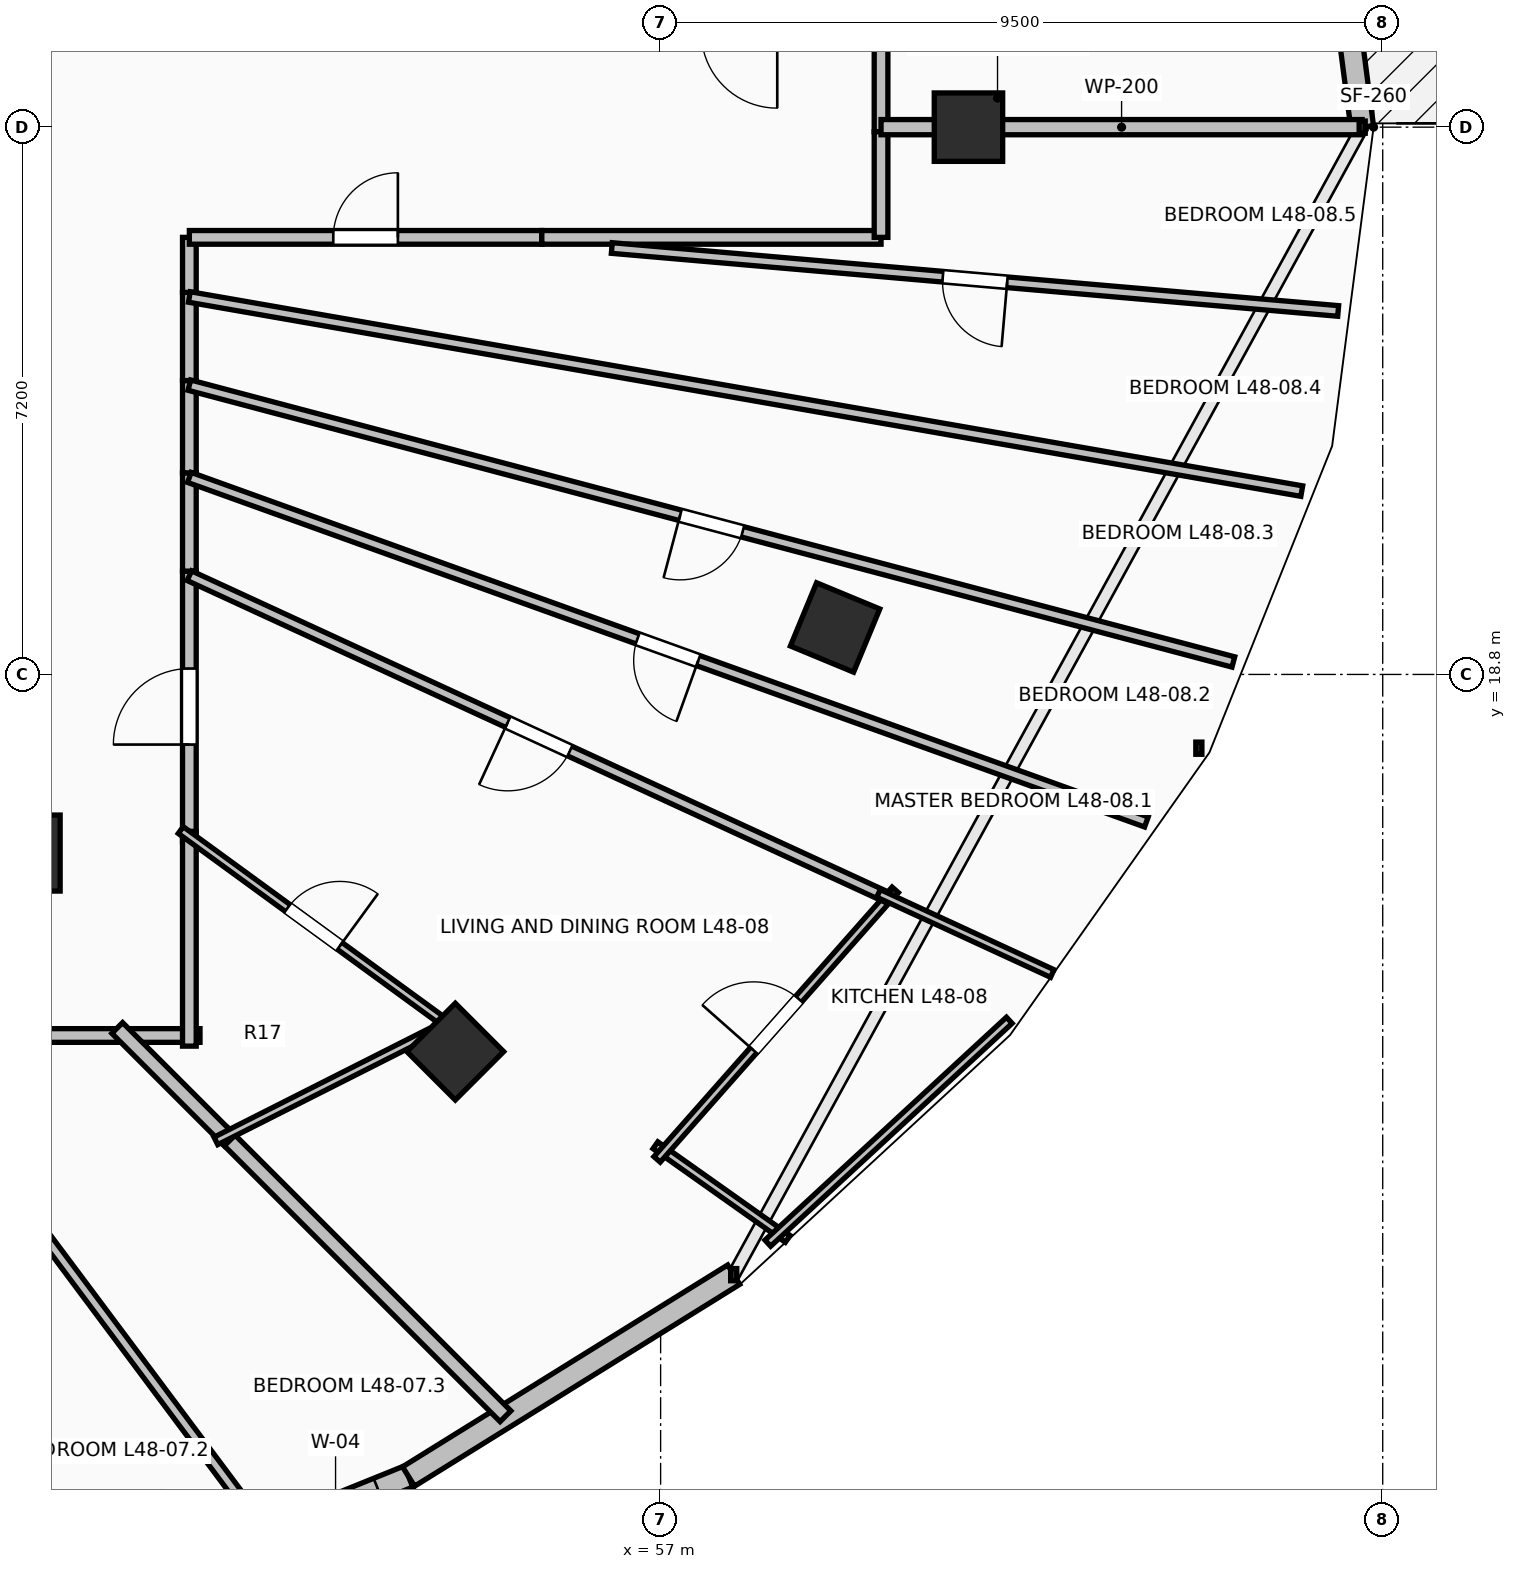
"""IFC4 building model, lengths in metres.
Left out: names, types, materials, properties, quantities, classifications, styles, units other than length and angle.
Written with IfcOpenShell. Run it as: python <this file> out.ifc"""

import sys

from ifc_helpers import new_model, si_unit, direction, frame, frame_2d, origin, origin_2d, place, context, subcontext, project, spatial, rectangle, extrude, element, fill, save


model = new_model("IFC4")
c1 = context("Model", 3, precision=1e-05, world=origin(), true_north=direction((0.0, 1.0)))
c2 = subcontext(c1, "Body", "Model", "MODEL_VIEW")
j1 = project(units=[si_unit("LENGTHUNIT", "METRE"), si_unit("PLANEANGLEUNIT", "RADIAN")], contexts=[c1])
p1 = place(None, origin())
s1 = spatial("IfcSite", under=j1, at=p1, CompositionType="ELEMENT")
p2 = place(p1, origin())
s2 = spatial("IfcBuilding", under=s1, at=p2, CompositionType="ELEMENT")
p3 = place(p2, frame((0.0, 0.0, 179.1)))
s3 = spatial("IfcBuildingStorey", under=s2, at=p3, CompositionType="ELEMENT", Elevation=179.1)
for number, where, z_axis, x_axis in (
    (1, (61.05, 26.0, 0.0), (0.0, 0.0, 1.0), (1.0, 0.0, 0.0)),
    (2, (54.299, 13.838, 0.0), (0.0, 0.0, 1.0), (0.707, -0.707, 0.0)),
    (3, (59.295, 19.418, 0.0), (0.0, 0.0, 1.0), (0.924, -0.383, 0.0)),
):
    element("IfcColumn", number, at=place(p3, frame(where, z_axis=z_axis, x_axis=x_axis)), inside=s3, PredefinedType="COLUMN", context=c2, shape_type="SweptSolid", body=[
        extrude(rectangle(XDim=0.9, YDim=0.9, at=origin_2d()), origin(), (0.0, 0.0, 1.0), 3.5),
    ])
p4 = place(p3, frame((48.75, 16.45, 0.0), z_axis=(0.0, 0.0, 1.0), x_axis=(1.0, 0.0, 0.0)))
e4 = element("IfcColumn", 4, at=p4, inside=s3, PredefinedType="PILASTER", context=c2, shape_type="SweptSolid", body=[
    extrude(rectangle(XDim=0.7, YDim=1.0, at=origin_2d()), origin(), (0.0, 0.0, 1.0), 3.5),
])
p5 = place(p3, frame((66.23, 26.0, 0.0), z_axis=(0.0, 0.0, 1.0), x_axis=(-0.129147853268, 0.991625348605, 0.0)))
e5 = element("IfcWall", 5, at=p5, inside=s3, PredefinedType="STANDARD", context=c2, shape_type="SweptSolid", body=[
    extrude(rectangle(XDim=4.2, YDim=0.3, at=frame_2d((2.1, 0.0))), origin(), (0.0, 0.0, 1.0), 3.24),
])
p6 = place(p5, frame((1.3, 0.0, 0.0)))
e6 = element("IfcOpeningElement", 6, at=p6, cuts=e5, PredefinedType="OPENING", context=c2, shape_type="SweptSolid", body=[
    extrude(rectangle(XDim=1.6, YDim=2.3, at=frame_2d((0.8, 1.15))), frame((0.0, 0.165, 0.0), z_axis=(0.0, -1.0, 0.0), x_axis=(1.0, 0.0, 0.0)), (0.0, 0.0, 1.0), 0.33),
])
p7 = place(p3, frame((48.803, 6.275, 0.0), z_axis=(0.0, 0.0, 1.0), x_axis=(0.927111094334, 0.374786630981, 0.0)))
e7 = element("IfcWall", 7, at=p7, inside=s3, PredefinedType="STANDARD", context=c2, shape_type="SweptSolid", body=[
    extrude(rectangle(XDim=5.264, YDim=0.3, at=frame_2d((2.632, 0.0))), origin(), (0.0, 0.0, 1.0), 3.24),
])
p8 = place(p7, frame((1.618, 0.0, 0.85)))
e8 = element("IfcOpeningElement", 8, at=p8, cuts=e7, PredefinedType="OPENING", context=c2, shape_type="SweptSolid", body=[
    extrude(rectangle(XDim=1.2, YDim=1.95, at=frame_2d((0.6, 0.975))), frame((0.0, 0.165, 0.0), z_axis=(0.0, -1.0, 0.0), x_axis=(1.0, 0.0, 0.0)), (0.0, 0.0, 1.0), 0.33),
])
p9 = place(p7, frame((3.628, 0.0, 0.85)))
e9 = element("IfcOpeningElement", 9, at=p9, cuts=e7, PredefinedType="OPENING", context=c2, shape_type="SweptSolid", body=[
    extrude(rectangle(XDim=1.2, YDim=1.95, at=frame_2d((0.6, 0.975))), frame((0.0, 0.165, 0.0), z_axis=(0.0, -1.0, 0.0), x_axis=(1.0, 0.0, 0.0)), (0.0, 0.0, 1.0), 0.33),
])
p10 = place(p3, frame((53.684, 8.248, 0.0), z_axis=(0.0, 0.0, 1.0), x_axis=(0.849647657754, 0.527350791858, 0.0)))
e10 = element("IfcWall", 10, at=p10, inside=s3, PredefinedType="STANDARD", context=c2, shape_type="SweptSolid", body=[
    extrude(rectangle(XDim=5.035, YDim=0.3, at=frame_2d((2.518, 0.0))), origin(), (0.0, 0.0, 1.0), 3.24),
])
p11 = place(p3, frame((59.9, 25.94, 0.0), z_axis=(0.0, 0.0, 1.0), x_axis=(0.0, 1.0, 0.0)))
e11 = element("IfcWall", 11, at=p11, inside=s3, PredefinedType="PARTITIONING", context=c2, shape_type="SweptSolid", body=[
    extrude(rectangle(XDim=1.31, YDim=0.18, at=frame_2d((0.655, 0.0))), origin(), (0.0, 0.0, 1.0), 2.432),
])
p12 = place(p3, frame((46.998, 14.05, 0.0), z_axis=(0.0, 0.0, 1.0), x_axis=(1.0, 0.0, 0.0)))
e12 = element("IfcWall", 12, at=p12, inside=s3, PredefinedType="PARTITIONING", context=c2, shape_type="SweptSolid", body=[
    extrude(rectangle(XDim=3.037, YDim=0.18, at=frame_2d((1.519, 0.0))), origin(), (0.0, 0.0, 1.0), 2.432),
])
p13 = place(p12, frame((1.094, 0.0, 0.0)))
e13 = element("IfcOpeningElement", 13, at=p13, cuts=e12, PredefinedType="OPENING", context=c2, shape_type="SweptSolid", body=[
    extrude(rectangle(XDim=0.85, YDim=2.1, at=frame_2d((0.425, 1.05))), frame((0.0, 0.105, 0.0), z_axis=(0.0, -1.0, 0.0), x_axis=(1.0, 0.0, 0.0)), (0.0, 0.0, 1.0), 0.21),
])
p14 = place(p3, frame((50.8, 16.596, 0.0), z_axis=(0.0, 0.0, 1.0), x_axis=(0.0, 1.0, 0.0)))
e14 = element("IfcWall", 14, at=p14, inside=s3, PredefinedType="PARTITIONING", context=c2, shape_type="SweptSolid", body=[
    extrude(rectangle(XDim=3.563, YDim=0.18, at=frame_2d((1.781, 0.0))), origin(), (0.0, 0.0, 1.0), 2.922),
])
p15 = place(p14, frame((1.281, 0.0, 0.0)))
e15 = element("IfcOpeningElement", 15, at=p15, cuts=e14, PredefinedType="OPENING", context=c2, shape_type="SweptSolid", body=[
    extrude(rectangle(XDim=1.0, YDim=2.15, at=frame_2d((0.5, 1.075))), frame((0.0, 0.105, 0.0), z_axis=(0.0, -1.0, 0.0), x_axis=(1.0, 0.0, 0.0)), (0.0, 0.0, 1.0), 0.21),
])
p16 = place(p3, frame((49.895, 14.05, 0.0), z_axis=(0.0, 0.0, 1.0), x_axis=(1.0, 0.0, 0.0)))
e16 = element("IfcWall", 16, at=p16, inside=s3, PredefinedType="PARTITIONING", context=c2, shape_type="SweptSolid", body=[
    extrude(rectangle(XDim=1.045, YDim=0.18, at=frame_2d((0.522, 0.0))), origin(), (0.0, 0.0, 1.0), 2.874),
])
p17 = place(p3, frame((50.8, 13.91, 0.0), z_axis=(0.0, 0.0, 1.0), x_axis=(0.0, 1.0, 0.0)))
e17 = element("IfcWall", 17, at=p17, inside=s3, PredefinedType="PARTITIONING", context=c2, shape_type="SweptSolid", body=[
    extrude(rectangle(XDim=2.826, YDim=0.18, at=frame_2d((1.413, 0.0))), origin(), (0.0, 0.0, 1.0), 2.432),
])
p18 = place(p3, frame((50.8, 20.159, 0.0), z_axis=(0.0, 0.0, 1.0), x_axis=(0.0, 1.0, 0.0)))
e18 = element("IfcWall", 18, at=p18, inside=s3, PredefinedType="PARTITIONING", context=c2, shape_type="SweptSolid", body=[
    extrude(rectangle(XDim=1.293, YDim=0.18, at=frame_2d((0.646, 0.0))), origin(), (0.0, 0.0, 1.0), 3.24),
])
p19 = place(p3, frame((50.8, 21.452, 0.0), z_axis=(0.0, 0.0, 1.0), x_axis=(0.0, 1.0, 0.0)))
e19 = element("IfcWall", 19, at=p19, inside=s3, PredefinedType="PARTITIONING", context=c2, shape_type="SweptSolid", body=[
    extrude(rectangle(XDim=1.214, YDim=0.18, at=frame_2d((0.607, 0.0))), origin(), (0.0, 0.0, 1.0), 3.24),
])
p20 = place(p3, frame((50.8, 22.666, 0.0), z_axis=(0.0, 0.0, 1.0), x_axis=(0.0, 1.0, 0.0)))
e20 = element("IfcWall", 20, at=p20, inside=s3, PredefinedType="PARTITIONING", context=c2, shape_type="SweptSolid", body=[
    extrude(rectangle(XDim=1.16, YDim=0.18, at=frame_2d((0.58, 0.0))), origin(), (0.0, 0.0, 1.0), 3.24),
])
p21 = place(p3, frame((50.8, 23.826, 0.0), z_axis=(0.0, 0.0, 1.0), x_axis=(0.0, 1.0, 0.0)))
e21 = element("IfcWall", 21, at=p21, inside=s3, PredefinedType="PARTITIONING", context=c2, shape_type="SweptSolid", body=[
    extrude(rectangle(XDim=0.724, YDim=0.18, at=frame_2d((0.362, 0.0))), origin(), (0.0, 0.0, 1.0), 3.24),
])
p22 = place(p3, frame((50.8, 24.55, 0.0), z_axis=(0.0, 0.0, 1.0), x_axis=(1.0, 0.0, 0.0)))
e22 = element("IfcWall", 22, at=p22, inside=s3, PredefinedType="PARTITIONING", context=c2, shape_type="SweptSolid", body=[
    extrude(rectangle(XDim=4.637, YDim=0.18, at=frame_2d((2.318, 0.0))), origin(), (0.0, 0.0, 1.0), 2.432),
])
p23 = place(p22, frame((1.894, 0.0, 0.0)))
e23 = element("IfcOpeningElement", 23, at=p23, cuts=e22, PredefinedType="OPENING", context=c2, shape_type="SweptSolid", body=[
    extrude(rectangle(XDim=0.85, YDim=2.1, at=frame_2d((0.425, 1.05))), frame((0.0, 0.105, 0.0), z_axis=(0.0, -1.0, 0.0), x_axis=(1.0, 0.0, 0.0)), (0.0, 0.0, 1.0), 0.21),
])
p24 = place(p3, frame((55.437, 24.55, 0.0), z_axis=(0.0, 0.0, 1.0), x_axis=(1.0, 0.0, 0.0)))
e24 = element("IfcWall", 24, at=p24, inside=s3, PredefinedType="PARTITIONING", context=c2, shape_type="SweptSolid", body=[
    extrude(rectangle(XDim=4.463, YDim=0.18, at=frame_2d((2.231, 0.0))), origin(), (0.0, 0.0, 1.0), 2.874),
])
p25 = place(p3, frame((59.9, 24.55, 0.0), z_axis=(0.0, 0.0, 1.0), x_axis=(0.0, 1.0, 0.0)))
e25 = element("IfcWall", 25, at=p25, inside=s3, PredefinedType="PARTITIONING", context=c2, shape_type="SweptSolid", body=[
    extrude(rectangle(XDim=1.39, YDim=0.18, at=frame_2d((0.695, 0.0))), origin(), (0.0, 0.0, 1.0), 2.432),
])
p26 = place(p3, frame((59.9, 26.0, 0.0), z_axis=(0.0, 0.0, 1.0), x_axis=(1.0, 0.0, 0.0)))
e26 = element("IfcWall", 26, at=p26, inside=s3, PredefinedType="PARTITIONING", context=c2, shape_type="SweptSolid", body=[
    extrude(rectangle(XDim=6.329, YDim=0.2, at=frame_2d((3.165, 0.0))), origin(), (0.0, 0.0, 1.0), 2.432),
])
p27 = place(p3, frame((51.818, 7.496, 0.0), z_axis=(0.0, 0.0, 1.0), x_axis=(-0.598399090147, 0.801198183292, 0.0)))
e27 = element("IfcWall", 27, at=p27, inside=s3, PredefinedType="PARTITIONING", context=c2, shape_type="SweptSolid", body=[
    extrude(rectangle(XDim=8.18, YDim=0.14, at=frame_2d((4.09, 0.0))), origin(), (0.0, 0.0, 1.0), 2.432),
])
p28 = place(p3, frame((54.959, 9.041, 0.0), z_axis=(0.0, 0.0, 1.0), x_axis=(-0.707106781187, 0.707106781187, 0.0)))
e28 = element("IfcWall", 28, at=p28, inside=s3, PredefinedType="PARTITIONING", context=c2, shape_type="SweptSolid", body=[
    extrude(rectangle(XDim=5.271, YDim=0.2, at=frame_2d((2.635, 0.0))), origin(), (0.0, 0.0, 1.0), 2.774),
])
p29 = place(p3, frame((51.331, 12.669, 0.0), z_axis=(0.0, 0.0, 1.0), x_axis=(-0.707106781187, 0.707106781187, 0.0)))
e29 = element("IfcWall", 29, at=p29, inside=s3, PredefinedType="PARTITIONING", context=c2, shape_type="SweptSolid", body=[
    extrude(rectangle(XDim=2.093, YDim=0.2, at=frame_2d((1.046, 0.0))), origin(), (0.0, 0.0, 1.0), 2.874),
])
p30 = place(p3, frame((50.687, 16.752, 0.0), z_axis=(0.0, 0.0, 1.0), x_axis=(0.808074646764, -0.589080100883, 0.0)))
e30 = element("IfcWall", 30, at=p30, inside=s3, PredefinedType="PARTITIONING", context=c2, shape_type="SweptSolid", body=[
    extrude(rectangle(XDim=4.329, YDim=0.11, at=frame_2d((2.165, 0.0))), origin(), (0.0, 0.0, 1.0), 2.874),
])
p31 = place(p30, frame((1.74, 0.0, 0.0)))
e31 = element("IfcOpeningElement", 31, at=p31, cuts=e30, PredefinedType="OPENING", context=c2, shape_type="SweptSolid", body=[
    extrude(rectangle(XDim=0.85, YDim=2.1, at=frame_2d((0.425, 1.05))), frame((0.0, 0.07, 0.0), z_axis=(0.0, -1.0, 0.0), x_axis=(1.0, 0.0, 0.0)), (0.0, 0.0, 1.0), 0.14),
])
p32 = place(p3, frame((53.964, 14.085, 0.0), z_axis=(0.0, 0.0, 1.0), x_axis=(-0.892546166909, -0.450956028828, 0.0)))
e32 = element("IfcWall", 32, at=p32, inside=s3, PredefinedType="PARTITIONING", context=c2, shape_type="SweptSolid", body=[
    extrude(rectangle(XDim=3.154, YDim=0.11, at=frame_2d((1.577, 0.0))), origin(), (0.0, 0.0, 1.0), 2.432),
])
p33 = place(p3, frame((58.672, 11.374, 0.0), z_axis=(0.0, 0.0, 1.0), x_axis=(-0.816262906602, 0.577680592807, 0.0)))
e33 = element("IfcWall", 33, at=p33, inside=s3, PredefinedType="PARTITIONING", context=c2, shape_type="SweptSolid", body=[
    extrude(rectangle(XDim=2.133, YDim=0.11, at=frame_2d((1.066, 0.0))), origin(), (0.0, 0.0, 1.0), 3.24),
])
p34 = place(p3, frame((56.953, 12.42, 0.0), z_axis=(0.0, 0.0, 1.0), x_axis=(0.662189711464, 0.749336230294, 0.0)))
e34 = element("IfcWall", 34, at=p34, inside=s3, PredefinedType="PARTITIONING", context=c2, shape_type="SweptSolid", body=[
    extrude(rectangle(XDim=4.732, YDim=0.11, at=frame_2d((2.366, 0.0))), origin(), (0.0, 0.0, 1.0), 3.24),
])
p35 = place(p34, frame((1.916, 0.0, 0.0)))
e35 = element("IfcOpeningElement", 35, at=p35, cuts=e34, PredefinedType="OPENING", context=c2, shape_type="SweptSolid", body=[
    extrude(rectangle(XDim=0.9, YDim=2.1, at=frame_2d((0.45, 1.05))), frame((0.0, 0.07, 0.0), z_axis=(0.0, -1.0, 0.0), x_axis=(1.0, 0.0, 0.0)), (0.0, 0.0, 1.0), 0.14),
])
p36 = place(p3, frame((58.41, 11.318, 0.0), z_axis=(0.0, 0.0, 1.0), x_axis=(0.734861902375, 0.678216768031, 0.0)))
e36 = element("IfcWall", 36, at=p36, inside=s3, PredefinedType="PARTITIONING", context=c2, shape_type="SweptSolid", body=[
    extrude(rectangle(XDim=4.323, YDim=0.11, at=frame_2d((2.162, 0.0))), origin(), (0.0, 0.0, 1.0), 3.24),
])
p37 = place(p3, frame((59.994, 15.861, 0.0), z_axis=(0.0, 0.0, 1.0), x_axis=(-0.908157621609, 0.41862839645, 0.0)))
e37 = element("IfcWall", 37, at=p37, inside=s3, PredefinedType="PARTITIONING", context=c2, shape_type="SweptSolid", body=[
    extrude(rectangle(XDim=10.124, YDim=0.14, at=frame_2d((5.062, 0.0))), origin(), (0.0, 0.0, 1.0), 2.774),
])
p38 = place(p37, frame((4.612, 0.0, 0.0)))
e38 = element("IfcOpeningElement", 38, at=p38, cuts=e37, PredefinedType="OPENING", context=c2, shape_type="SweptSolid", body=[
    extrude(rectangle(XDim=0.9, YDim=2.1, at=frame_2d((0.45, 1.05))), frame((0.0, 0.085, 0.0), z_axis=(0.0, -1.0, 0.0), x_axis=(1.0, 0.0, 0.0)), (0.0, 0.0, 1.0), 0.17),
])
p39 = place(p3, frame((62.153, 14.865, 0.0), z_axis=(0.0, 0.0, 1.0), x_axis=(-0.908101251341, 0.418750662462, 0.0)))
e39 = element("IfcWall", 39, at=p39, inside=s3, PredefinedType="PARTITIONING", context=c2, shape_type="SweptSolid", body=[
    extrude(rectangle(XDim=2.518, YDim=0.11, at=frame_2d((1.259, 0.0))), origin(), (0.0, 0.0, 1.0), 3.24),
])
p40 = place(p3, frame((63.391, 16.859, 0.0), z_axis=(0.0, 0.0, 1.0), x_axis=(-0.940877411069, 0.338747246985, 0.0)))
e40 = element("IfcWall", 40, at=p40, inside=s3, PredefinedType="PARTITIONING", context=c2, shape_type="SweptSolid", body=[
    extrude(rectangle(XDim=13.382, YDim=0.14, at=frame_2d((6.691, 0.0))), origin(), (0.0, 0.0, 1.0), 2.774),
])
p41 = place(p40, frame((6.266, 0.0, 0.0)))
e41 = element("IfcOpeningElement", 41, at=p41, cuts=e40, PredefinedType="OPENING", context=c2, shape_type="SweptSolid", body=[
    extrude(rectangle(XDim=0.85, YDim=2.1, at=frame_2d((0.425, 1.05))), frame((0.0, 0.085, 0.0), z_axis=(0.0, -1.0, 0.0), x_axis=(1.0, 0.0, 0.0)), (0.0, 0.0, 1.0), 0.17),
])
p42 = place(p3, frame((64.535, 18.964, 0.0), z_axis=(0.0, 0.0, 1.0), x_axis=(-0.966598137313, 0.256296782934, 0.0)))
e42 = element("IfcWall", 42, at=p42, inside=s3, PredefinedType="PARTITIONING", context=c2, shape_type="SweptSolid", body=[
    extrude(rectangle(XDim=14.209, YDim=0.14, at=frame_2d((7.105, 0.0))), origin(), (0.0, 0.0, 1.0), 2.432),
])
p43 = place(p42, frame((6.68, 0.0, 0.0)))
e43 = element("IfcOpeningElement", 43, at=p43, cuts=e42, PredefinedType="OPENING", context=c2, shape_type="SweptSolid", body=[
    extrude(rectangle(XDim=0.85, YDim=2.1, at=frame_2d((0.425, 1.05))), frame((0.0, 0.085, 0.0), z_axis=(0.0, -1.0, 0.0), x_axis=(1.0, 0.0, 0.0)), (0.0, 0.0, 1.0), 0.17),
])
p44 = place(p3, frame((65.435, 21.212, 0.0), z_axis=(0.0, 0.0, 1.0), x_axis=(-0.985109541297, 0.171927867563, 0.0)))
e44 = element("IfcWall", 44, at=p44, inside=s3, PredefinedType="PARTITIONING", context=c2, shape_type="SweptSolid", body=[
    extrude(rectangle(XDim=14.856, YDim=0.14, at=frame_2d((7.428, 0.0))), origin(), (0.0, 0.0, 1.0), 2.432),
])
p45 = place(p3, frame((65.914, 23.582, 0.0), z_axis=(0.0, 0.0, 1.0), x_axis=(-0.99626832952, 0.086309997072, 0.0)))
e45 = element("IfcWall", 45, at=p45, inside=s3, PredefinedType="PARTITIONING", context=c2, shape_type="SweptSolid", body=[
    extrude(rectangle(XDim=9.592, YDim=0.14, at=frame_2d((4.796, 0.0))), origin(), (0.0, 0.0, 1.0), 2.774),
])
p46 = place(p45, frame((4.371, 0.0, 0.0)))
e46 = element("IfcOpeningElement", 46, at=p46, cuts=e45, PredefinedType="OPENING", context=c2, shape_type="SweptSolid", body=[
    extrude(rectangle(XDim=0.85, YDim=2.1, at=frame_2d((0.425, 1.05))), frame((0.0, 0.085, 0.0), z_axis=(0.0, -1.0, 0.0), x_axis=(1.0, 0.0, 0.0)), (0.0, 0.0, 1.0), 0.17),
])
p47 = place(p9, origin())
e47 = element("IfcWindow", 47, at=p47, inside=s3, PartitioningType="SINGLE_PANEL", PredefinedType="WINDOW", context=c2, shape_type="SweptSolid", body=[
    extrude(rectangle(XDim=1.2, YDim=1.95, at=frame_2d((0.6, 0.975))), frame((0.0, 0.03, 0.0), z_axis=(0.0, -1.0, 0.0), x_axis=(1.0, 0.0, 0.0)), (0.0, 0.0, 1.0), 0.06),
])
fill(e9, e47)
p48 = place(p15, origin())
e48 = element("IfcDoor", 48, at=p48, inside=s3, OperationType="SINGLE_SWING_LEFT", PredefinedType="DOOR", context=c2, shape_type="SweptSolid", body=[
    extrude(rectangle(XDim=1.0, YDim=2.15, at=frame_2d((0.5, 1.075))), frame((0.0, 0.025, 0.0), z_axis=(0.0, -1.0, 0.0), x_axis=(1.0, 0.0, 0.0)), (0.0, 0.0, 1.0), 0.05),
])
fill(e15, e48)
p49 = place(p31, origin())
e49 = element("IfcDoor", 49, at=p49, inside=s3, OperationType="SINGLE_SWING_RIGHT", PredefinedType="DOOR", context=c2, shape_type="SweptSolid", body=[
    extrude(rectangle(XDim=0.85, YDim=2.1, at=frame_2d((0.425, 1.05))), frame((0.0, 0.025, 0.0), z_axis=(0.0, -1.0, 0.0), x_axis=(1.0, 0.0, 0.0)), (0.0, 0.0, 1.0), 0.05),
])
fill(e31, e49)
p50 = place(p35, origin())
e50 = element("IfcDoor", 50, at=p50, inside=s3, OperationType="SINGLE_SWING_LEFT", PredefinedType="DOOR", context=c2, shape_type="SweptSolid", body=[
    extrude(rectangle(XDim=0.9, YDim=2.1, at=frame_2d((0.45, 1.05))), frame((0.0, 0.025, 0.0), z_axis=(0.0, -1.0, 0.0), x_axis=(1.0, 0.0, 0.0)), (0.0, 0.0, 1.0), 0.05),
])
fill(e35, e50)
p51 = place(p38, origin())
e51 = element("IfcDoor", 51, at=p51, inside=s3, OperationType="SINGLE_SWING_RIGHT", PredefinedType="DOOR", context=c2, shape_type="SweptSolid", body=[
    extrude(rectangle(XDim=0.9, YDim=2.1, at=frame_2d((0.45, 1.05))), frame((0.0, 0.025, 0.0), z_axis=(0.0, -1.0, 0.0), x_axis=(1.0, 0.0, 0.0)), (0.0, 0.0, 1.0), 0.05),
])
fill(e38, e51)
p52 = place(p23, origin())
e52 = element("IfcDoor", 52, at=p52, inside=s3, OperationType="SINGLE_SWING_RIGHT", PredefinedType="DOOR", context=c2, shape_type="SweptSolid", body=[
    extrude(rectangle(XDim=0.85, YDim=2.1, at=frame_2d((0.425, 1.05))), frame((0.0, 0.025, 0.0), z_axis=(0.0, -1.0, 0.0), x_axis=(1.0, 0.0, 0.0)), (0.0, 0.0, 1.0), 0.05),
])
fill(e23, e52)
p53 = place(p41, origin())
e53 = element("IfcDoor", 53, at=p53, inside=s3, OperationType="SINGLE_SWING_LEFT", PredefinedType="DOOR", context=c2, shape_type="SweptSolid", body=[
    extrude(rectangle(XDim=0.85, YDim=2.1, at=frame_2d((0.425, 1.05))), frame((0.0, 0.025, 0.0), z_axis=(0.0, -1.0, 0.0), x_axis=(1.0, 0.0, 0.0)), (0.0, 0.0, 1.0), 0.05),
])
fill(e41, e53)
p54 = place(p43, origin())
e54 = element("IfcDoor", 54, at=p54, inside=s3, OperationType="SINGLE_SWING_RIGHT", PredefinedType="DOOR", context=c2, shape_type="SweptSolid", body=[
    extrude(rectangle(XDim=0.85, YDim=2.1, at=frame_2d((0.425, 1.05))), frame((0.0, 0.025, 0.0), z_axis=(0.0, -1.0, 0.0), x_axis=(1.0, 0.0, 0.0)), (0.0, 0.0, 1.0), 0.05),
])
fill(e43, e54)
p55 = place(p46, origin())
e55 = element("IfcDoor", 55, at=p55, inside=s3, OperationType="SINGLE_SWING_LEFT", PredefinedType="DOOR", context=c2, shape_type="SweptSolid", body=[
    extrude(rectangle(XDim=0.85, YDim=2.1, at=frame_2d((0.425, 1.05))), frame((0.0, 0.025, 0.0), z_axis=(0.0, -1.0, 0.0), x_axis=(1.0, 0.0, 0.0)), (0.0, 0.0, 1.0), 0.05),
])
fill(e46, e55)
save(model, sys.argv[1])
